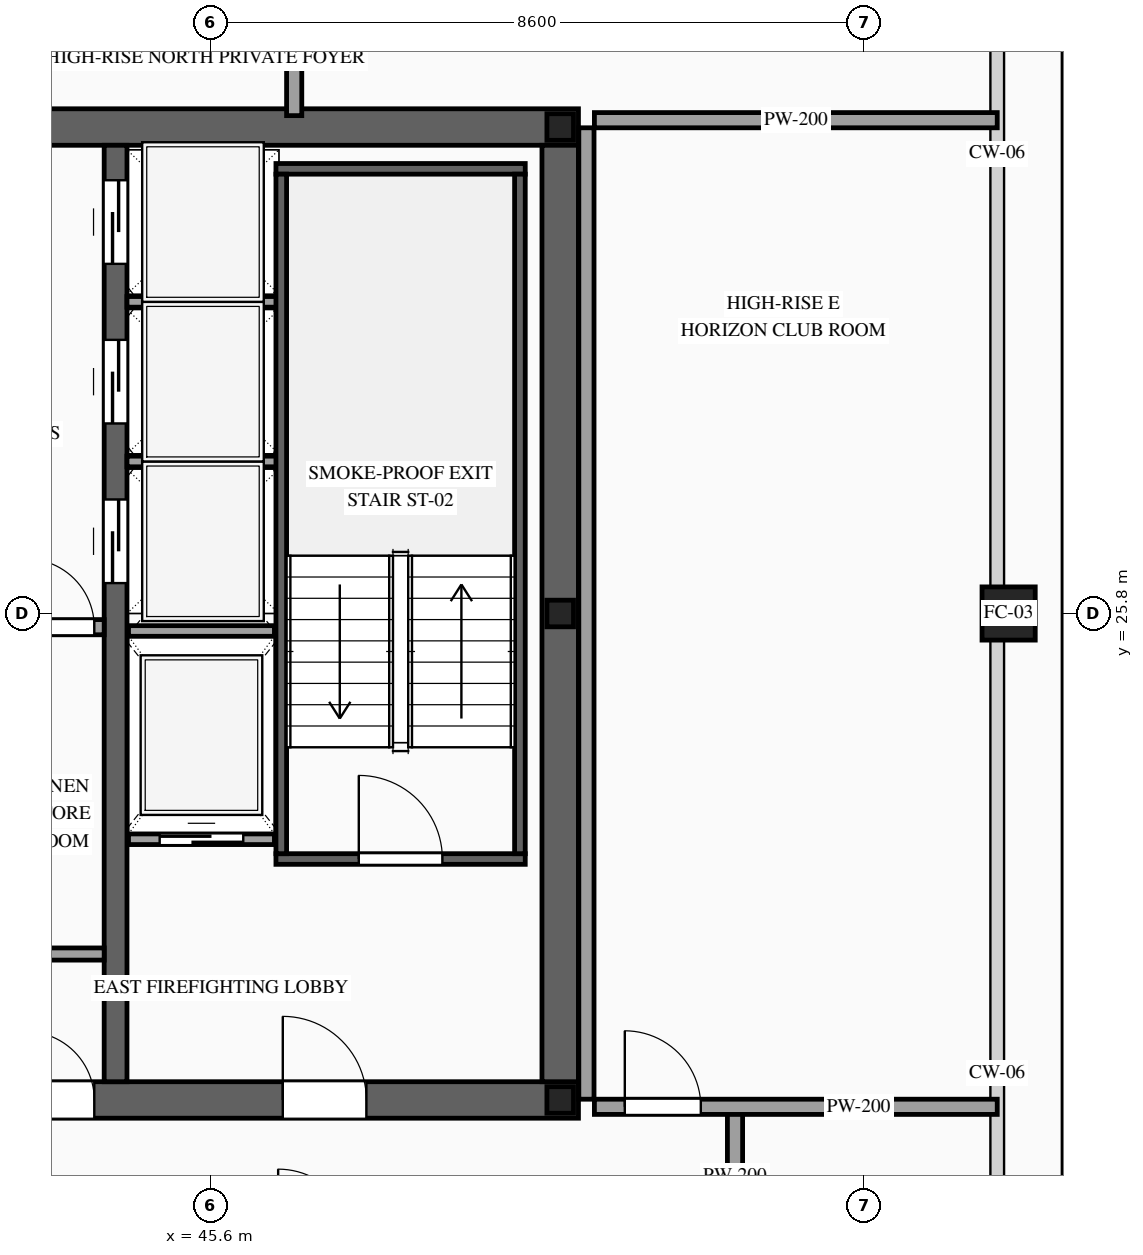
"""IFC4 building model, lengths in metres.
Left out: names, types, materials, properties, quantities, classifications, styles, units other than length and angle.
Written with IfcOpenShell. Run it as: python <this file> out.ifc"""

import sys

from ifc_helpers import new_model, si_unit, direction, frame, frame_2d, origin, origin_2d, place, context, subcontext, project, spatial, rectangle, hollow_rectangle, i_section, extrude, source, transform, mapped, element, fill, save


model = new_model("IFC4")
c1 = context("Model", 3, precision=1e-05, world=origin(), true_north=direction((0.0, 1.0)))
c2 = subcontext(c1, "Body", "Model", "MODEL_VIEW")
j1 = project(units=[si_unit("LENGTHUNIT", "METRE"), si_unit("PLANEANGLEUNIT", "RADIAN")], contexts=[c1])
p1 = place(None, origin())
s1 = spatial("IfcSite", under=j1, at=p1, CompositionType="ELEMENT")
p2 = place(p1, origin())
s2 = spatial("IfcBuilding", under=s1, at=p2, CompositionType="ELEMENT")
p3 = place(p2, frame((0.0, 0.0, 318.2)))
s3 = spatial("IfcBuildingStorey", under=s2, at=p3, CompositionType="ELEMENT", Elevation=318.2)
p4 = place(p3, frame((23.56, 19.4, 0.0), z_axis=(0.0, 0.0, 1.0), x_axis=(1.0, 0.0, 0.0)))
e1 = element("IfcWall", 1, at=p4, inside=s3, PredefinedType="SHEAR", context=c2, shape_type="SweptSolid", body=[
    extrude(rectangle(XDim=26.88, YDim=0.48, at=frame_2d((13.44, 0.0))), origin(), (0.0, 0.0, 1.0), 3.5),
])
p5 = place(p4, frame((1.89, 0.0, 0.0)))
e2 = element("IfcOpeningElement", 2, at=p5, cuts=e1, PredefinedType="OPENING", context=c2, shape_type="SweptSolid", body=[
    extrude(rectangle(XDim=1.1, YDim=2.2, at=frame_2d((0.55, 1.1))), frame((0.0, 0.255, 0.0), z_axis=(0.0, -1.0, 0.0), x_axis=(1.0, 0.0, 0.0)), (0.0, 0.0, 1.0), 0.51),
])
p6 = place(p4, frame((9.79, 0.0, 0.0)))
e3 = element("IfcOpeningElement", 3, at=p6, cuts=e1, PredefinedType="OPENING", context=c2, shape_type="SweptSolid", body=[
    extrude(rectangle(XDim=1.1, YDim=2.2, at=frame_2d((0.55, 1.1))), frame((0.0, 0.255, 0.0), z_axis=(0.0, -1.0, 0.0), x_axis=(1.0, 0.0, 0.0)), (0.0, 0.0, 1.0), 0.51),
])
p7 = place(p4, frame((22.99, 0.0, 0.0)))
e4 = element("IfcOpeningElement", 4, at=p7, cuts=e1, PredefinedType="OPENING", context=c2, shape_type="SweptSolid", body=[
    extrude(rectangle(XDim=1.1, YDim=2.2, at=frame_2d((0.55, 1.1))), frame((0.0, 0.255, 0.0), z_axis=(0.0, -1.0, 0.0), x_axis=(1.0, 0.0, 0.0)), (0.0, 0.0, 1.0), 0.51),
])
p8 = place(p4, frame((19.61, 0.0, 0.0)))
e5 = element("IfcOpeningElement", 5, at=p8, cuts=e1, PredefinedType="OPENING", context=c2, shape_type="SweptSolid", body=[
    extrude(rectangle(XDim=0.9, YDim=2.15, at=frame_2d((0.45, 1.075))), frame((0.0, 0.255, 0.0), z_axis=(0.0, -1.0, 0.0), x_axis=(1.0, 0.0, 0.0)), (0.0, 0.0, 1.0), 0.51),
])
p9 = place(p4, frame((18.17, 0.0, 0.0)))
e6 = element("IfcOpeningElement", 6, at=p9, cuts=e1, PredefinedType="OPENING", context=c2, shape_type="SweptSolid", body=[
    extrude(rectangle(XDim=0.9, YDim=2.15, at=frame_2d((0.45, 1.075))), frame((0.0, 0.255, 0.0), z_axis=(0.0, -1.0, 0.0), x_axis=(1.0, 0.0, 0.0)), (0.0, 0.0, 1.0), 0.51),
])
p10 = place(p3, frame((23.56, 32.2, 0.0), z_axis=(0.0, 0.0, 1.0), x_axis=(1.0, 0.0, 0.0)))
e7 = element("IfcWall", 7, at=p10, inside=s3, PredefinedType="SHEAR", context=c2, shape_type="SweptSolid", body=[
    extrude(rectangle(XDim=26.88, YDim=0.48, at=frame_2d((13.44, 0.0))), origin(), (0.0, 0.0, 1.0), 3.5),
])
p11 = place(p10, frame((4.51, 0.0, 0.0)))
e8 = element("IfcOpeningElement", 8, at=p11, cuts=e7, PredefinedType="OPENING", context=c2, shape_type="SweptSolid", body=[
    extrude(rectangle(XDim=0.9, YDim=2.15, at=frame_2d((0.45, 1.075))), frame((0.0, 0.255, 0.0), z_axis=(0.0, -1.0, 0.0), x_axis=(1.0, 0.0, 0.0)), (0.0, 0.0, 1.0), 0.51),
])
p12 = place(p10, frame((9.79, 0.0, 0.0)))
e9 = element("IfcOpeningElement", 9, at=p12, cuts=e7, PredefinedType="OPENING", context=c2, shape_type="SweptSolid", body=[
    extrude(rectangle(XDim=1.1, YDim=2.2, at=frame_2d((0.55, 1.1))), frame((0.0, 0.255, 0.0), z_axis=(0.0, -1.0, 0.0), x_axis=(1.0, 0.0, 0.0)), (0.0, 0.0, 1.0), 0.51),
])
p13 = place(p10, frame((15.64, 0.0, 0.0)))
e10 = element("IfcOpeningElement", 10, at=p13, cuts=e7, PredefinedType="OPENING", context=c2, shape_type="SweptSolid", body=[
    extrude(rectangle(XDim=1.1, YDim=2.2, at=frame_2d((0.55, 1.1))), frame((0.0, 0.255, 0.0), z_axis=(0.0, -1.0, 0.0), x_axis=(1.0, 0.0, 0.0)), (0.0, 0.0, 1.0), 0.51),
])
p14 = place(p10, frame((18.74, 0.0, 0.0)))
e11 = element("IfcOpeningElement", 11, at=p14, cuts=e7, PredefinedType="OPENING", context=c2, shape_type="SweptSolid", body=[
    extrude(rectangle(XDim=1.1, YDim=2.2, at=frame_2d((0.55, 1.1))), frame((0.0, 0.255, 0.0), z_axis=(0.0, -1.0, 0.0), x_axis=(1.0, 0.0, 0.0)), (0.0, 0.0, 1.0), 0.51),
])
m1 = source(origin(), c2, "Body", "SweptSolid", [
    extrude(rectangle(XDim=12.32, YDim=0.48, at=frame_2d((6.16, 0.0))), origin(), (0.0, 0.0, 1.0), 3.5),
])
p15 = place(p3, frame((50.2, 19.64, 0.0), z_axis=(0.0, 0.0, 1.0), x_axis=(0.0, 1.0, 0.0)))
e12 = element("IfcWall", 12, at=p15, inside=s3, PredefinedType="SHEAR", context=c2, shape_type="MappedRepresentation", body=[
    mapped(m1, transform((0.0, 0.0, 0.0), scale=1.0)),
])
p16 = place(p3, frame((44.35, 19.64, 0.0), z_axis=(0.0, 0.0, 1.0), x_axis=(0.0, 1.0, 0.0)))
e13 = element("IfcWall", 13, at=p16, inside=s3, PredefinedType="SOLIDWALL", context=c2, shape_type="SweptSolid", body=[
    extrude(rectangle(XDim=12.32, YDim=0.3, at=frame_2d((6.16, 0.0))), origin(), (0.0, 0.0, 1.0), 3.5),
])
p17 = place(p16, frame((6.56, 0.0, 0.0)))
e14 = element("IfcOpeningElement", 14, at=p17, cuts=e13, PredefinedType="OPENING", context=c2, shape_type="SweptSolid", body=[
    extrude(rectangle(XDim=1.1, YDim=2.2, at=frame_2d((0.55, 1.1))), frame((0.0, 0.165, 0.0), z_axis=(0.0, -1.0, 0.0), x_axis=(1.0, 0.0, 0.0)), (0.0, 0.0, 1.0), 0.33),
])
p18 = place(p16, frame((8.66, 0.0, 0.0)))
e15 = element("IfcOpeningElement", 15, at=p18, cuts=e13, PredefinedType="OPENING", context=c2, shape_type="SweptSolid", body=[
    extrude(rectangle(XDim=1.1, YDim=2.2, at=frame_2d((0.55, 1.1))), frame((0.0, 0.165, 0.0), z_axis=(0.0, -1.0, 0.0), x_axis=(1.0, 0.0, 0.0)), (0.0, 0.0, 1.0), 0.33),
])
p19 = place(p16, frame((10.76, 0.0, 0.0)))
e16 = element("IfcOpeningElement", 16, at=p19, cuts=e13, PredefinedType="OPENING", context=c2, shape_type="SweptSolid", body=[
    extrude(rectangle(XDim=1.1, YDim=2.2, at=frame_2d((0.55, 1.1))), frame((0.0, 0.165, 0.0), z_axis=(0.0, -1.0, 0.0), x_axis=(1.0, 0.0, 0.0)), (0.0, 0.0, 1.0), 0.33),
])
m2 = source(origin(), c2, "Body", "SweptSolid", [
    extrude(i_section(OverallWidth=0.35, OverallDepth=0.35, WebThickness=0.012, FlangeThickness=0.019, at=origin_2d()), origin(), (0.0, 0.0, 1.0), 3.5),
])
for number, where, z_axis, x_axis in (
    (17, (50.2, 19.4, 0.0), (0.0, 0.0, 1.0), (1.0, 0.0, 0.0)),
    (18, (50.2, 25.8, 0.0), (0.0, 0.0, 1.0), (1.0, 0.0, 0.0)),
    (19, (50.2, 32.2, 0.0), (0.0, 0.0, 1.0), (1.0, 0.0, 0.0)),
):
    element("IfcColumn", number, at=place(p3, frame(where, z_axis=z_axis, x_axis=x_axis)), inside=s3, PredefinedType="COLUMN", context=c2, shape_type="MappedRepresentation", body=[
        mapped(m2, transform((0.0, 0.0, 0.0), scale=1.0)),
    ])
m3 = source(origin(), c2, "Body", "SweptSolid", [
    extrude(hollow_rectangle(XDim=0.7, YDim=0.7, WallThickness=0.032, at=origin_2d()), origin(), (0.0, 0.0, 1.0), 3.5),
])
p20 = place(p3, frame((56.1, 25.8, 0.0), z_axis=(0.0, 0.0, 1.0), x_axis=(1.0, 0.0, 0.0)))
e20 = element("IfcColumn", 20, at=p20, inside=s3, PredefinedType="COLUMN", context=c2, shape_type="MappedRepresentation", body=[
    mapped(m3, transform((0.0, 0.0, 0.0), scale=1.0)),
])
p21 = place(p3, frame((44.52, 22.83, 0.0), z_axis=(0.0, 0.0, 1.0), x_axis=(1.0, 0.0, 0.0)))
e21 = element("IfcWall", 21, at=p21, inside=s3, PredefinedType="SOLIDWALL", context=c2, shape_type="SweptSolid", body=[
    extrude(rectangle(XDim=1.92, YDim=0.14, at=frame_2d((0.96, 0.0))), origin(), (0.0, 0.0, 1.0), 3.28),
])
p22 = place(p21, frame((0.41, 0.0, 0.0)))
e22 = element("IfcOpeningElement", 22, at=p22, cuts=e21, PredefinedType="OPENING", context=c2, shape_type="SweptSolid", body=[
    extrude(rectangle(XDim=1.1, YDim=2.2, at=frame_2d((0.55, 1.1))), frame((0.0, 0.085, 0.0), z_axis=(0.0, -1.0, 0.0), x_axis=(1.0, 0.0, 0.0)), (0.0, 0.0, 1.0), 0.17),
])
m4 = source(origin(), c2, "Body", "SweptSolid", [
    extrude(rectangle(XDim=1.92, YDim=0.14, at=frame_2d((0.96, 0.0))), origin(), (0.0, 0.0, 1.0), 3.28),
])
p23 = place(p3, frame((44.52, 25.57, 0.0), z_axis=(0.0, 0.0, 1.0), x_axis=(1.0, 0.0, 0.0)))
e23 = element("IfcWall", 23, at=p23, inside=s3, PredefinedType="SOLIDWALL", context=c2, shape_type="MappedRepresentation", body=[
    mapped(m4, transform((0.0, 0.0, 0.0), scale=1.0)),
])
m5 = source(origin(), c2, "Body", "SweptSolid", [
    extrude(rectangle(XDim=2.0, YDim=0.14, at=frame_2d((1.0, 0.0))), origin(), (0.0, 0.0, 1.0), 3.28),
])
for number, where, z_axis, x_axis in (
    (24, (44.5, 27.8, 0.0), (0.0, 0.0, 1.0), (1.0, 0.0, 0.0)),
    (25, (44.5, 29.9, 0.0), (0.0, 0.0, 1.0), (1.0, 0.0, 0.0)),
):
    element("IfcWall", number, at=place(p3, frame(where, z_axis=z_axis, x_axis=x_axis)), inside=s3, PredefinedType="SOLIDWALL", context=c2, shape_type="MappedRepresentation", body=[
        mapped(m5, transform((0.0, 0.0, 0.0), scale=1.0)),
    ])
p24 = place(p3, frame((46.46, 22.57, 0.0), z_axis=(0.0, 0.0, 1.0), x_axis=(1.0, 0.0, 0.0)))
e26 = element("IfcWall", 26, at=p24, inside=s3, PredefinedType="SOLIDWALL", context=c2, shape_type="SweptSolid", body=[
    extrude(rectangle(XDim=3.28, YDim=0.14, at=frame_2d((1.64, 0.0))), origin(), (0.0, 0.0, 1.0), 3.28),
])
p25 = place(p24, frame((1.09, 0.0, 0.0)))
e27 = element("IfcOpeningElement", 27, at=p25, cuts=e26, PredefinedType="OPENING", context=c2, shape_type="SweptSolid", body=[
    extrude(rectangle(XDim=1.1, YDim=2.2, at=frame_2d((0.55, 1.1))), frame((0.0, 0.085, 0.0), z_axis=(0.0, -1.0, 0.0), x_axis=(1.0, 0.0, 0.0)), (0.0, 0.0, 1.0), 0.17),
])
m6 = source(origin(), c2, "Body", "SweptSolid", [
    extrude(rectangle(XDim=3.28, YDim=0.14, at=frame_2d((1.64, 0.0))), origin(), (0.0, 0.0, 1.0), 3.28),
])
p26 = place(p3, frame((46.46, 31.65, 0.0), z_axis=(0.0, 0.0, 1.0), x_axis=(1.0, 0.0, 0.0)))
e28 = element("IfcWall", 28, at=p26, inside=s3, PredefinedType="SOLIDWALL", context=c2, shape_type="MappedRepresentation", body=[
    mapped(m6, transform((0.0, 0.0, 0.0), scale=1.0)),
])
m7 = source(origin(), c2, "Body", "SweptSolid", [
    extrude(rectangle(XDim=8.94, YDim=0.14, at=frame_2d((4.47, 0.0))), origin(), (0.0, 0.0, 1.0), 3.28),
])
for number, where, z_axis, x_axis in (
    (29, (46.53, 22.64, 0.0), (0.0, 0.0, 1.0), (0.0, 1.0, 0.0)),
    (30, (49.67, 22.64, 0.0), (0.0, 0.0, 1.0), (0.0, 1.0, 0.0)),
):
    element("IfcWall", number, at=place(p3, frame(where, z_axis=z_axis, x_axis=x_axis)), inside=s3, PredefinedType="SOLIDWALL", context=c2, shape_type="MappedRepresentation", body=[
        mapped(m7, transform((0.0, 0.0, 0.0), scale=1.0)),
    ])
m8 = source(origin(), c2, "Body", "SweptSolid", [
    extrude(rectangle(XDim=1.17, YDim=0.16, at=frame_2d((0.585, 0.0))), origin(), (0.0, 0.0, 1.0), 3.28),
])
p27 = place(p3, frame((43.03, 21.32, 0.0), z_axis=(0.0, 0.0, 1.0), x_axis=(1.0, 0.0, 0.0)))
e31 = element("IfcWall", 31, at=p27, inside=s3, PredefinedType="PARTITIONING", context=c2, shape_type="MappedRepresentation", body=[
    mapped(m8, transform((0.0, 0.0, 0.0), scale=1.0)),
])
p28 = place(p3, frame((43.05, 25.62, 0.0), z_axis=(0.0, 0.0, 1.0), x_axis=(1.0, 0.0, 0.0)))
e32 = element("IfcWall", 32, at=p28, inside=s3, PredefinedType="PARTITIONING", context=c2, shape_type="SweptSolid", body=[
    extrude(rectangle(XDim=1.15, YDim=0.2, at=frame_2d((0.575, 0.0))), origin(), (0.0, 0.0, 1.0), 3.28),
])
p29 = place(p28, frame((0.12, 0.0, 0.0)))
e33 = element("IfcOpeningElement", 33, at=p29, cuts=e32, PredefinedType="OPENING", context=c2, shape_type="SweptSolid", body=[
    extrude(rectangle(XDim=0.9, YDim=2.15, at=frame_2d((0.45, 1.075))), frame((0.0, 0.115, 0.0), z_axis=(0.0, -1.0, 0.0), x_axis=(1.0, 0.0, 0.0)), (0.0, 0.0, 1.0), 0.23),
])
m9 = source(origin(), c2, "Body", "SweptSolid", [
    extrude(rectangle(XDim=1.7, YDim=0.2, at=frame_2d((0.85, 0.0))), origin(), (0.0, 0.0, 1.0), 3.28),
])
for number, where, z_axis, x_axis in (
    (34, (46.7, 32.35, 0.0), (0.0, 0.0, 1.0), (0.0, 1.0, 0.0)),
    (35, (52.5, 17.55, 0.0), (0.0, 0.0, 1.0), (0.0, 1.0, 0.0)),
):
    element("IfcWall", number, at=place(p3, frame(where, z_axis=z_axis, x_axis=x_axis)), inside=s3, PredefinedType="PARTITIONING", context=c2, shape_type="MappedRepresentation", body=[
        mapped(m9, transform((0.0, 0.0, 0.0), scale=1.0)),
    ])
p30 = place(p3, frame((50.65, 19.31, 0.0), z_axis=(0.0, 0.0, 1.0), x_axis=(1.0, 0.0, 0.0)))
e36 = element("IfcWall", 36, at=p30, inside=s3, PredefinedType="PARTITIONING", context=c2, shape_type="SweptSolid", body=[
    extrude(rectangle(XDim=5.3, YDim=0.2, at=frame_2d((2.65, 0.0))), origin(), (0.0, 0.0, 1.0), 2.825),
])
p31 = place(p30, frame((0.4, 0.0, 0.0)))
e37 = element("IfcOpeningElement", 37, at=p31, cuts=e36, PredefinedType="OPENING", context=c2, shape_type="SweptSolid", body=[
    extrude(rectangle(XDim=1.0, YDim=2.2, at=frame_2d((0.5, 1.1))), frame((0.0, 0.115, 0.0), z_axis=(0.0, -1.0, 0.0), x_axis=(1.0, 0.0, 0.0)), (0.0, 0.0, 1.0), 0.23),
])
m10 = source(origin(), c2, "Body", "SweptSolid", [
    extrude(rectangle(XDim=5.3, YDim=0.2, at=frame_2d((2.65, 0.0))), origin(), (0.0, 0.0, 1.0), 2.825),
])
p32 = place(p3, frame((50.65, 32.29, 0.0), z_axis=(0.0, 0.0, 1.0), x_axis=(1.0, 0.0, 0.0)))
e38 = element("IfcWall", 38, at=p32, inside=s3, PredefinedType="PARTITIONING", context=c2, shape_type="MappedRepresentation", body=[
    mapped(m10, transform((0.0, 0.0, 0.0), scale=1.0)),
])
m11 = source(origin(), c2, "Body", "SweptSolid", [
    extrude(rectangle(XDim=12.78, YDim=0.2, at=frame_2d((6.39, 0.0))), origin(), (0.0, 0.0, 1.0), 3.28),
])
p33 = place(p3, frame((50.545, 19.41, 0.0), z_axis=(0.0, 0.0, 1.0), x_axis=(0.0, 1.0, 0.0)))
e39 = element("IfcWall", 39, at=p33, inside=s3, PredefinedType="PARTITIONING", context=c2, shape_type="MappedRepresentation", body=[
    mapped(m11, transform((0.0, 0.0, 0.0), scale=1.0)),
])
m12 = source(origin(), c2, "Body", "SweptSolid", [
    extrude(rectangle(XDim=1.1, YDim=2.2, at=frame_2d((0.55, 1.1))), frame((0.0, 0.025, 0.0), z_axis=(0.0, -1.0, 0.0), x_axis=(1.0, 0.0, 0.0)), (0.0, 0.0, 1.0), 0.05),
])
p34 = place(p22, origin())
e40 = element("IfcDoor", 40, at=p34, inside=s3, OperationType="SLIDING_TO_RIGHT", PredefinedType="DOOR", context=c2, shape_type="MappedRepresentation", body=[
    mapped(m12, transform((0.0, 0.0, 0.0), scale=1.0)),
])
fill(e22, e40)
p35 = place(p17, origin())
e41 = element("IfcDoor", 41, at=p35, inside=s3, OperationType="SLIDING_TO_LEFT", PredefinedType="DOOR", context=c2, shape_type="MappedRepresentation", body=[
    mapped(m12, transform((0.0, 0.0, 0.0), scale=1.0)),
])
fill(e14, e41)
p36 = place(p18, origin())
e42 = element("IfcDoor", 42, at=p36, inside=s3, OperationType="SLIDING_TO_RIGHT", PredefinedType="DOOR", context=c2, shape_type="MappedRepresentation", body=[
    mapped(m12, transform((0.0, 0.0, 0.0), scale=1.0)),
])
fill(e15, e42)
p37 = place(p19, origin())
e43 = element("IfcDoor", 43, at=p37, inside=s3, OperationType="SLIDING_TO_LEFT", PredefinedType="DOOR", context=c2, shape_type="MappedRepresentation", body=[
    mapped(m12, transform((0.0, 0.0, 0.0), scale=1.0)),
])
fill(e16, e43)
m13 = source(origin(), c2, "Body", "SweptSolid", [
    extrude(rectangle(XDim=1.1, YDim=2.2, at=frame_2d((0.55, 1.1))), frame((0.0, 0.025, 0.0), z_axis=(0.0, -1.0, 0.0), x_axis=(1.0, 0.0, 0.0)), (0.0, 0.0, 1.0), 0.05),
])
p38 = place(p25, origin())
e44 = element("IfcDoor", 44, at=p38, inside=s3, OperationType="SINGLE_SWING_LEFT", PredefinedType="DOOR", context=c2, shape_type="MappedRepresentation", body=[
    mapped(m13, transform((0.0, 0.0, 0.0), scale=1.0)),
])
fill(e27, e44)
p39 = place(p7, origin())
e45 = element("IfcDoor", 45, at=p39, inside=s3, OperationType="SINGLE_SWING_LEFT", PredefinedType="DOOR", context=c2, shape_type="MappedRepresentation", body=[
    mapped(m13, transform((0.0, 0.0, 0.0), scale=1.0)),
])
fill(e4, e45)
m14 = source(origin(), c2, "Body", "SweptSolid", [
    extrude(rectangle(XDim=0.9, YDim=2.15, at=frame_2d((0.45, 1.075))), frame((0.0, 0.025, 0.0), z_axis=(0.0, -1.0, 0.0), x_axis=(1.0, 0.0, 0.0)), (0.0, 0.0, 1.0), 0.05),
])
p40 = place(p8, origin())
e46 = element("IfcDoor", 46, at=p40, inside=s3, OperationType="SINGLE_SWING_LEFT", PredefinedType="DOOR", context=c2, shape_type="MappedRepresentation", body=[
    mapped(m14, transform((0.0, 0.0, 0.0), scale=1.0)),
])
fill(e5, e46)
p41 = place(p29, origin())
e47 = element("IfcDoor", 47, at=p41, inside=s3, OperationType="SINGLE_SWING_LEFT", PredefinedType="DOOR", context=c2, shape_type="MappedRepresentation", body=[
    mapped(m14, transform((0.0, 0.0, 0.0), scale=1.0)),
])
fill(e33, e47)
m15 = source(origin(), c2, "Body", "SweptSolid", [
    extrude(rectangle(XDim=1.0, YDim=2.2, at=frame_2d((0.5, 1.1))), frame((0.0, 0.025, 0.0), z_axis=(0.0, -1.0, 0.0), x_axis=(1.0, 0.0, 0.0)), (0.0, 0.0, 1.0), 0.05),
])
p42 = place(p31, origin())
e48 = element("IfcDoor", 48, at=p42, inside=s3, OperationType="SINGLE_SWING_LEFT", PredefinedType="DOOR", context=c2, shape_type="MappedRepresentation", body=[
    mapped(m15, transform((0.0, 0.0, 0.0), scale=1.0)),
])
fill(e37, e48)
save(model, sys.argv[1])
